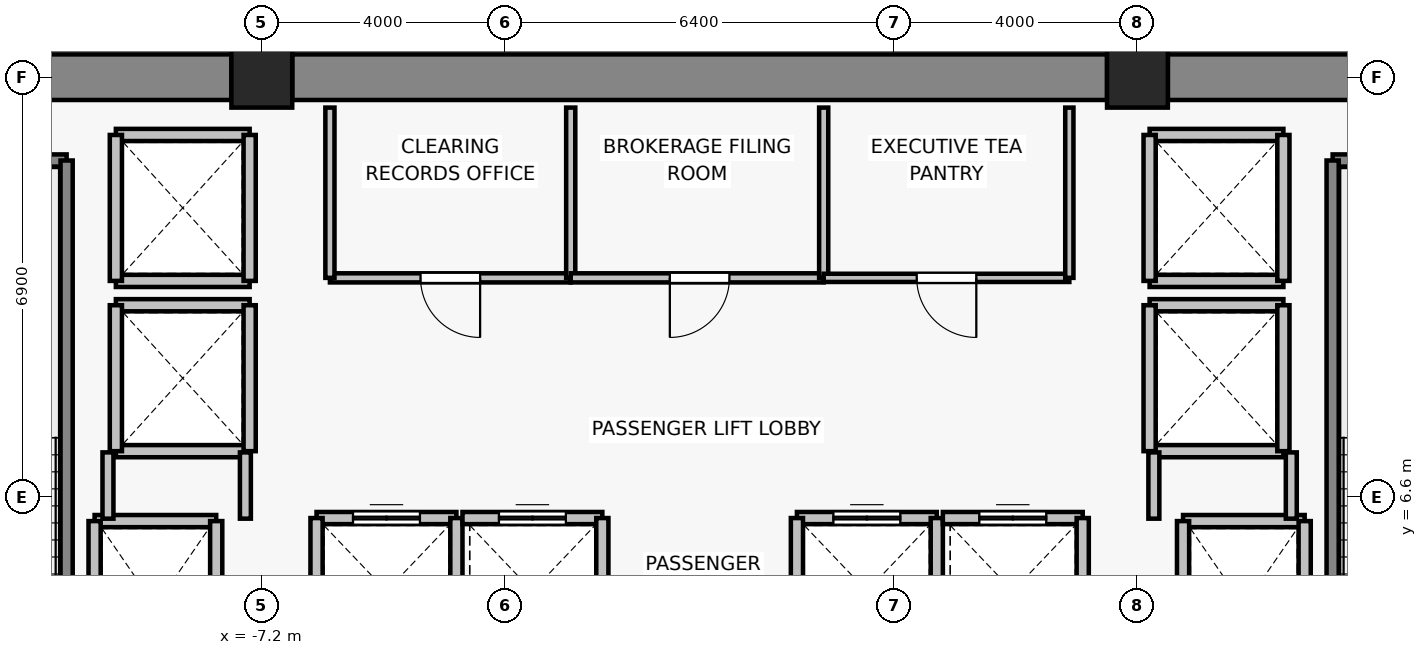
"""IFC4 building model, lengths in metres.
Left out: names, types, materials, properties, quantities, classifications, styles, units other than length and angle.
Written with IfcOpenShell. Run it as: python <this file> out.ifc"""

import sys

from ifc_helpers import new_model, si_unit, direction, frame, frame_2d, origin, origin_2d, place, context, subcontext, project, spatial, rectangle, extrude, source, transform, mapped, element, fill, save


model = new_model("IFC4")
c1 = context("Model", 3, precision=1e-05, world=origin(), true_north=direction((0.0, 1.0)))
c2 = subcontext(c1, "Body", "Model", "MODEL_VIEW")
j1 = project(units=[si_unit("LENGTHUNIT", "METRE"), si_unit("PLANEANGLEUNIT", "RADIAN")], contexts=[c1])
p1 = place(None, origin())
s1 = spatial("IfcSite", under=j1, at=p1, CompositionType="ELEMENT")
p2 = place(p1, origin())
s2 = spatial("IfcBuilding", under=s1, at=p2, CompositionType="ELEMENT")
p3 = place(p2, frame((0.0, 0.0, 133.0)))
s3 = spatial("IfcBuildingStorey", under=s2, at=p3, CompositionType="ELEMENT", Elevation=133.0)
for number, where, z_axis, x_axis in (
    (1, (-7.2, 13.5, 0.0), (0.0, 0.0, 1.0), (1.0, 0.0, 0.0)),
    (2, (7.2, 13.5, 0.0), (0.0, 0.0, 1.0), (1.0, 0.0, 0.0)),
):
    element("IfcColumn", number, at=place(p3, frame(where, z_axis=z_axis, x_axis=x_axis)), inside=s3, PredefinedType="COLUMN", context=c2, shape_type="SweptSolid", body=[
        extrude(rectangle(XDim=1.0, YDim=1.0, at=origin_2d()), origin(), (0.0, 0.0, 1.0), 3.3),
    ])
p4 = place(p3, frame((-13.9, 13.5, 0.0), z_axis=(0.0, 0.0, 1.0), x_axis=(1.0, 0.0, 0.0)))
e3 = element("IfcWall", 3, at=p4, inside=s3, PredefinedType="SHEAR", context=c2, shape_type="SweptSolid", body=[
    extrude(rectangle(XDim=6.2, YDim=0.75, at=frame_2d((3.1, 0.0))), origin(), (0.0, 0.0, 1.0), 3.075),
])
p5 = place(p3, frame((-6.7, 13.5, 0.0), z_axis=(0.0, 0.0, 1.0), x_axis=(1.0, 0.0, 0.0)))
e4 = element("IfcWall", 4, at=p5, inside=s3, PredefinedType="SHEAR", context=c2, shape_type="SweptSolid", body=[
    extrude(rectangle(XDim=13.4, YDim=0.75, at=frame_2d((6.7, 0.0))), origin(), (0.0, 0.0, 1.0), 3.075),
])
p6 = place(p3, frame((7.7, 13.5, 0.0), z_axis=(0.0, 0.0, 1.0), x_axis=(1.0, 0.0, 0.0)))
e5 = element("IfcWall", 5, at=p6, inside=s3, PredefinedType="SHEAR", context=c2, shape_type="SweptSolid", body=[
    extrude(rectangle(XDim=6.2, YDim=0.75, at=frame_2d((3.1, 0.0))), origin(), (0.0, 0.0, 1.0), 3.075),
])
p7 = place(p3, frame((-9.95, 6.2, 0.0), z_axis=(0.0, 0.0, 1.0), x_axis=(1.0, 0.0, 0.0)))
e6 = element("IfcWall", 6, at=p7, inside=s3, PredefinedType="SOLIDWALL", context=c2, shape_type="SweptSolid", body=[
    extrude(rectangle(XDim=2.0, YDim=0.2, at=frame_2d((1.0, 0.0))), origin(), (0.0, 0.0, 1.0), 3.075),
])
for number, where, z_axis, x_axis in (
    (7, (-9.95, 3.4, 0.0), (0.0, 0.0, 1.0), (0.0, 1.0, 0.0)),
    (8, (-7.95, 6.2, 0.0), (0.0, 0.0, 1.0), (0.0, -1.0, 0.0)),
):
    element("IfcWall", number, at=place(p3, frame(where, z_axis=z_axis, x_axis=x_axis)), inside=s3, PredefinedType="SOLIDWALL", context=c2, shape_type="SweptSolid", body=[
        extrude(rectangle(XDim=2.8, YDim=0.2, at=frame_2d((1.4, 0.0))), origin(), (0.0, 0.0, 1.0), 3.075),
    ])
p8 = place(p3, frame((7.95, 6.2, 0.0), z_axis=(0.0, 0.0, 1.0), x_axis=(1.0, 0.0, 0.0)))
e9 = element("IfcWall", 9, at=p8, inside=s3, PredefinedType="SOLIDWALL", context=c2, shape_type="SweptSolid", body=[
    extrude(rectangle(XDim=2.0, YDim=0.2, at=frame_2d((1.0, 0.0))), origin(), (0.0, 0.0, 1.0), 3.075),
])
for number, where, z_axis, x_axis in (
    (10, (7.95, 3.4, 0.0), (0.0, 0.0, 1.0), (0.0, 1.0, 0.0)),
    (11, (9.95, 6.2, 0.0), (0.0, 0.0, 1.0), (0.0, -1.0, 0.0)),
):
    element("IfcWall", number, at=place(p3, frame(where, z_axis=z_axis, x_axis=x_axis)), inside=s3, PredefinedType="SOLIDWALL", context=c2, shape_type="SweptSolid", body=[
        extrude(rectangle(XDim=2.8, YDim=0.2, at=frame_2d((1.4, 0.0))), origin(), (0.0, 0.0, 1.0), 3.075),
    ])
p9 = place(p3, frame((-6.3, 6.25, 0.0), z_axis=(0.0, 0.0, 1.0), x_axis=(1.0, 0.0, 0.0)))
e12 = element("IfcWall", 12, at=p9, inside=s3, PredefinedType="SOLIDWALL", context=c2, shape_type="SweptSolid", body=[
    extrude(rectangle(XDim=2.3, YDim=0.2, at=frame_2d((1.15, 0.0))), origin(), (0.0, 0.0, 1.0), 3.075),
])
p10 = place(p9, frame((0.6, 0.0, 0.0)))
e13 = element("IfcOpeningElement", 13, at=p10, cuts=e12, PredefinedType="OPENING", context=c2, shape_type="SweptSolid", body=[
    extrude(rectangle(XDim=1.1, YDim=2.2, at=frame_2d((0.55, 1.1))), frame((0.0, 0.11, 0.0), z_axis=(0.0, -1.0, 0.0), x_axis=(1.0, 0.0, 0.0)), (0.0, 0.0, 1.0), 0.22),
])
for number, where, z_axis, x_axis in (
    (14, (-6.3, 3.85, 0.0), (0.0, 0.0, 1.0), (0.0, 1.0, 0.0)),
    (15, (-4.0, 6.25, 0.0), (0.0, 0.0, 1.0), (0.0, -1.0, 0.0)),
):
    element("IfcWall", number, at=place(p3, frame(where, z_axis=z_axis, x_axis=x_axis)), inside=s3, PredefinedType="SOLIDWALL", context=c2, shape_type="SweptSolid", body=[
        extrude(rectangle(XDim=2.4, YDim=0.2, at=frame_2d((1.2, 0.0))), origin(), (0.0, 0.0, 1.0), 3.075),
    ])
p11 = place(p3, frame((-3.9, 6.25, 0.0), z_axis=(0.0, 0.0, 1.0), x_axis=(1.0, 0.0, 0.0)))
e16 = element("IfcWall", 16, at=p11, inside=s3, PredefinedType="SOLIDWALL", context=c2, shape_type="SweptSolid", body=[
    extrude(rectangle(XDim=2.3, YDim=0.2, at=frame_2d((1.15, 0.0))), origin(), (0.0, 0.0, 1.0), 3.075),
])
p12 = place(p11, frame((0.6, 0.0, 0.0)))
e17 = element("IfcOpeningElement", 17, at=p12, cuts=e16, PredefinedType="OPENING", context=c2, shape_type="SweptSolid", body=[
    extrude(rectangle(XDim=1.1, YDim=2.2, at=frame_2d((0.55, 1.1))), frame((0.0, 0.11, 0.0), z_axis=(0.0, -1.0, 0.0), x_axis=(1.0, 0.0, 0.0)), (0.0, 0.0, 1.0), 0.22),
])
p13 = place(p3, frame((-1.6, 6.25, 0.0), z_axis=(0.0, 0.0, 1.0), x_axis=(0.0, -1.0, 0.0)))
e18 = element("IfcWall", 18, at=p13, inside=s3, PredefinedType="SOLIDWALL", context=c2, shape_type="SweptSolid", body=[
    extrude(rectangle(XDim=2.4, YDim=0.2, at=frame_2d((1.2, 0.0))), origin(), (0.0, 0.0, 1.0), 3.075),
])
p14 = place(p3, frame((1.6, 6.25, 0.0), z_axis=(0.0, 0.0, 1.0), x_axis=(1.0, 0.0, 0.0)))
e19 = element("IfcWall", 19, at=p14, inside=s3, PredefinedType="SOLIDWALL", context=c2, shape_type="SweptSolid", body=[
    extrude(rectangle(XDim=2.3, YDim=0.2, at=frame_2d((1.15, 0.0))), origin(), (0.0, 0.0, 1.0), 3.075),
])
p15 = place(p14, frame((0.6, 0.0, 0.0)))
e20 = element("IfcOpeningElement", 20, at=p15, cuts=e19, PredefinedType="OPENING", context=c2, shape_type="SweptSolid", body=[
    extrude(rectangle(XDim=1.1, YDim=2.2, at=frame_2d((0.55, 1.1))), frame((0.0, 0.11, 0.0), z_axis=(0.0, -1.0, 0.0), x_axis=(1.0, 0.0, 0.0)), (0.0, 0.0, 1.0), 0.22),
])
for number, where, z_axis, x_axis in (
    (21, (1.6, 3.85, 0.0), (0.0, 0.0, 1.0), (0.0, 1.0, 0.0)),
    (22, (3.9, 6.25, 0.0), (0.0, 0.0, 1.0), (0.0, -1.0, 0.0)),
):
    element("IfcWall", number, at=place(p3, frame(where, z_axis=z_axis, x_axis=x_axis)), inside=s3, PredefinedType="SOLIDWALL", context=c2, shape_type="SweptSolid", body=[
        extrude(rectangle(XDim=2.4, YDim=0.2, at=frame_2d((1.2, 0.0))), origin(), (0.0, 0.0, 1.0), 3.075),
    ])
p16 = place(p3, frame((4.0, 6.25, 0.0), z_axis=(0.0, 0.0, 1.0), x_axis=(1.0, 0.0, 0.0)))
e23 = element("IfcWall", 23, at=p16, inside=s3, PredefinedType="SOLIDWALL", context=c2, shape_type="SweptSolid", body=[
    extrude(rectangle(XDim=2.3, YDim=0.2, at=frame_2d((1.15, 0.0))), origin(), (0.0, 0.0, 1.0), 3.075),
])
p17 = place(p16, frame((0.6, 0.0, 0.0)))
e24 = element("IfcOpeningElement", 24, at=p17, cuts=e23, PredefinedType="OPENING", context=c2, shape_type="SweptSolid", body=[
    extrude(rectangle(XDim=1.1, YDim=2.2, at=frame_2d((0.55, 1.1))), frame((0.0, 0.11, 0.0), z_axis=(0.0, -1.0, 0.0), x_axis=(1.0, 0.0, 0.0)), (0.0, 0.0, 1.0), 0.22),
])
p18 = place(p3, frame((6.3, 6.25, 0.0), z_axis=(0.0, 0.0, 1.0), x_axis=(0.0, -1.0, 0.0)))
e25 = element("IfcWall", 25, at=p18, inside=s3, PredefinedType="SOLIDWALL", context=c2, shape_type="SweptSolid", body=[
    extrude(rectangle(XDim=2.4, YDim=0.2, at=frame_2d((1.2, 0.0))), origin(), (0.0, 0.0, 1.0), 3.075),
])
for number, where, z_axis, x_axis in (
    (26, (-7.4, 7.35, 0.0), (0.0, 0.0, 1.0), (-1.0, 0.0, 0.0)),
    (27, (-9.6, 9.75, 0.0), (0.0, 0.0, 1.0), (1.0, 0.0, 0.0)),
):
    element("IfcWall", number, at=place(p3, frame(where, z_axis=z_axis, x_axis=x_axis)), inside=s3, PredefinedType="SOLIDWALL", context=c2, shape_type="SweptSolid", body=[
        extrude(rectangle(XDim=2.2, YDim=0.2, at=frame_2d((1.1, 0.0))), origin(), (0.0, 0.0, 1.0), 2.515),
    ])
p19 = place(p3, frame((-9.6, 7.35, 0.0), z_axis=(0.0, 0.0, 1.0), x_axis=(0.0, 1.0, 0.0)))
e28 = element("IfcWall", 28, at=p19, inside=s3, PredefinedType="SOLIDWALL", context=c2, shape_type="SweptSolid", body=[
    extrude(rectangle(XDim=2.4, YDim=0.2, at=frame_2d((1.2, 0.0))), origin(), (0.0, 0.0, 1.0), 3.075),
])
p20 = place(p3, frame((-7.4, 9.75, 0.0), z_axis=(0.0, 0.0, 1.0), x_axis=(0.0, -1.0, 0.0)))
e29 = element("IfcWall", 29, at=p20, inside=s3, PredefinedType="SOLIDWALL", context=c2, shape_type="SweptSolid", body=[
    extrude(rectangle(XDim=2.4, YDim=0.2, at=frame_2d((1.2, 0.0))), origin(), (0.0, 0.0, 1.0), 2.515),
])
for number, where, z_axis, x_axis in (
    (30, (-7.4, 10.15, 0.0), (0.0, 0.0, 1.0), (-1.0, 0.0, 0.0)),
    (31, (-9.6, 12.55, 0.0), (0.0, 0.0, 1.0), (1.0, 0.0, 0.0)),
):
    element("IfcWall", number, at=place(p3, frame(where, z_axis=z_axis, x_axis=x_axis)), inside=s3, PredefinedType="SOLIDWALL", context=c2, shape_type="SweptSolid", body=[
        extrude(rectangle(XDim=2.2, YDim=0.2, at=frame_2d((1.1, 0.0))), origin(), (0.0, 0.0, 1.0), 2.515),
    ])
p21 = place(p3, frame((-9.6, 10.15, 0.0), z_axis=(0.0, 0.0, 1.0), x_axis=(0.0, 1.0, 0.0)))
e32 = element("IfcWall", 32, at=p21, inside=s3, PredefinedType="SOLIDWALL", context=c2, shape_type="SweptSolid", body=[
    extrude(rectangle(XDim=2.4, YDim=0.2, at=frame_2d((1.2, 0.0))), origin(), (0.0, 0.0, 1.0), 3.075),
])
p22 = place(p3, frame((-7.4, 12.55, 0.0), z_axis=(0.0, 0.0, 1.0), x_axis=(0.0, -1.0, 0.0)))
e33 = element("IfcWall", 33, at=p22, inside=s3, PredefinedType="SOLIDWALL", context=c2, shape_type="SweptSolid", body=[
    extrude(rectangle(XDim=2.4, YDim=0.2, at=frame_2d((1.2, 0.0))), origin(), (0.0, 0.0, 1.0), 2.515),
])
for number, where, z_axis, x_axis in (
    (34, (9.6, 7.35, 0.0), (0.0, 0.0, 1.0), (-1.0, 0.0, 0.0)),
    (35, (7.4, 9.75, 0.0), (0.0, 0.0, 1.0), (1.0, 0.0, 0.0)),
):
    element("IfcWall", number, at=place(p3, frame(where, z_axis=z_axis, x_axis=x_axis)), inside=s3, PredefinedType="SOLIDWALL", context=c2, shape_type="SweptSolid", body=[
        extrude(rectangle(XDim=2.2, YDim=0.2, at=frame_2d((1.1, 0.0))), origin(), (0.0, 0.0, 1.0), 2.515),
    ])
p23 = place(p3, frame((7.4, 7.35, 0.0), z_axis=(0.0, 0.0, 1.0), x_axis=(0.0, 1.0, 0.0)))
e36 = element("IfcWall", 36, at=p23, inside=s3, PredefinedType="SOLIDWALL", context=c2, shape_type="SweptSolid", body=[
    extrude(rectangle(XDim=2.4, YDim=0.2, at=frame_2d((1.2, 0.0))), origin(), (0.0, 0.0, 1.0), 2.515),
])
p24 = place(p3, frame((9.6, 9.75, 0.0), z_axis=(0.0, 0.0, 1.0), x_axis=(0.0, -1.0, 0.0)))
e37 = element("IfcWall", 37, at=p24, inside=s3, PredefinedType="SOLIDWALL", context=c2, shape_type="SweptSolid", body=[
    extrude(rectangle(XDim=2.4, YDim=0.2, at=frame_2d((1.2, 0.0))), origin(), (0.0, 0.0, 1.0), 3.075),
])
for number, where, z_axis, x_axis in (
    (38, (9.6, 10.15, 0.0), (0.0, 0.0, 1.0), (-1.0, 0.0, 0.0)),
    (39, (7.4, 12.55, 0.0), (0.0, 0.0, 1.0), (1.0, 0.0, 0.0)),
):
    element("IfcWall", number, at=place(p3, frame(where, z_axis=z_axis, x_axis=x_axis)), inside=s3, PredefinedType="SOLIDWALL", context=c2, shape_type="SweptSolid", body=[
        extrude(rectangle(XDim=2.2, YDim=0.2, at=frame_2d((1.1, 0.0))), origin(), (0.0, 0.0, 1.0), 2.515),
    ])
p25 = place(p3, frame((7.4, 10.15, 0.0), z_axis=(0.0, 0.0, 1.0), x_axis=(0.0, 1.0, 0.0)))
e40 = element("IfcWall", 40, at=p25, inside=s3, PredefinedType="SOLIDWALL", context=c2, shape_type="SweptSolid", body=[
    extrude(rectangle(XDim=2.4, YDim=0.2, at=frame_2d((1.2, 0.0))), origin(), (0.0, 0.0, 1.0), 2.515),
])
p26 = place(p3, frame((9.6, 12.55, 0.0), z_axis=(0.0, 0.0, 1.0), x_axis=(0.0, -1.0, 0.0)))
e41 = element("IfcWall", 41, at=p26, inside=s3, PredefinedType="SOLIDWALL", context=c2, shape_type="SweptSolid", body=[
    extrude(rectangle(XDim=2.4, YDim=0.2, at=frame_2d((1.2, 0.0))), origin(), (0.0, 0.0, 1.0), 3.075),
])
p27 = place(p3, frame((-13.93, 12.13, 0.0), z_axis=(0.0, 0.0, 1.0), x_axis=(1.0, 0.0, 0.0)))
e42 = element("IfcWall", 42, at=p27, inside=s3, PredefinedType="SOLIDWALL", context=c2, shape_type="SweptSolid", body=[
    extrude(rectangle(XDim=3.52, YDim=0.2, at=frame_2d((1.76, 0.0))), origin(), (0.0, 0.0, 1.0), 3.075),
])
p28 = place(p3, frame((-10.41, 12.13, 0.0), z_axis=(0.0, 0.0, 1.0), x_axis=(0.0, -1.0, 0.0)))
e43 = element("IfcWall", 43, at=p28, inside=s3, PredefinedType="SOLIDWALL", context=c2, shape_type="SweptSolid", body=[
    extrude(rectangle(XDim=8.84, YDim=0.2, at=frame_2d((4.42, 0.0))), origin(), (0.0, 0.0, 1.0), 3.075),
])
p29 = place(p3, frame((10.41, 12.13, 0.0), z_axis=(0.0, 0.0, 1.0), x_axis=(1.0, 0.0, 0.0)))
e44 = element("IfcWall", 44, at=p29, inside=s3, PredefinedType="SOLIDWALL", context=c2, shape_type="SweptSolid", body=[
    extrude(rectangle(XDim=3.52, YDim=0.2, at=frame_2d((1.76, 0.0))), origin(), (0.0, 0.0, 1.0), 3.075),
])
p30 = place(p3, frame((10.41, 3.29, 0.0), z_axis=(0.0, 0.0, 1.0), x_axis=(0.0, 1.0, 0.0)))
e45 = element("IfcWall", 45, at=p30, inside=s3, PredefinedType="SOLIDWALL", context=c2, shape_type="SweptSolid", body=[
    extrude(rectangle(XDim=8.84, YDim=0.2, at=frame_2d((4.42, 0.0))), origin(), (0.0, 0.0, 1.0), 3.075),
])
p31 = place(p3, frame((-9.73, 6.24, 0.0), z_axis=(0.0, 0.0, 1.0), x_axis=(0.0, 1.0, 0.0)))
e46 = element("IfcWall", 46, at=p31, inside=s3, PredefinedType="PARTITIONING", context=c2, shape_type="SweptSolid", body=[
    extrude(rectangle(XDim=1.09, YDim=0.18, at=frame_2d((0.545, 0.0))), origin(), (0.0, 0.0, 1.0), 3.075),
])
for number, where, z_axis, x_axis in (
    (47, (-7.47, 7.33, 0.0), (0.0, 0.0, 1.0), (0.0, -1.0, 0.0)),
    (48, (7.47, 6.24, 0.0), (0.0, 0.0, 1.0), (0.0, 1.0, 0.0)),
):
    element("IfcWall", number, at=place(p3, frame(where, z_axis=z_axis, x_axis=x_axis)), inside=s3, PredefinedType="PARTITIONING", context=c2, shape_type="SweptSolid", body=[
        extrude(rectangle(XDim=1.09, YDim=0.18, at=frame_2d((0.545, 0.0))), origin(), (0.0, 0.0, 1.0), 2.515),
    ])
p32 = place(p3, frame((9.73, 7.33, 0.0), z_axis=(0.0, 0.0, 1.0), x_axis=(0.0, -1.0, 0.0)))
e49 = element("IfcWall", 49, at=p32, inside=s3, PredefinedType="PARTITIONING", context=c2, shape_type="SweptSolid", body=[
    extrude(rectangle(XDim=1.09, YDim=0.18, at=frame_2d((0.545, 0.0))), origin(), (0.0, 0.0, 1.0), 3.075),
])
p33 = place(p3, frame((-2.12, 10.2, 0.0), z_axis=(0.0, 0.0, 1.0), x_axis=(-1.0, 0.0, 0.0)))
e50 = element("IfcWall", 50, at=p33, inside=s3, PredefinedType="PARTITIONING", context=c2, shape_type="SweptSolid", body=[
    extrude(rectangle(XDim=3.96, YDim=0.15, at=frame_2d((1.98, 0.0))), origin(), (0.0, 0.0, 1.0), 3.075),
])
p34 = place(p33, frame((1.49, 0.0, 0.0)))
e51 = element("IfcOpeningElement", 51, at=p34, cuts=e50, PredefinedType="OPENING", context=c2, shape_type="SweptSolid", body=[
    extrude(rectangle(XDim=0.98, YDim=2.15, at=frame_2d((0.49, 1.075))), frame((0.0, 0.085, 0.0), z_axis=(0.0, -1.0, 0.0), x_axis=(1.0, 0.0, 0.0)), (0.0, 0.0, 1.0), 0.17),
])
for number, where, z_axis, x_axis in (
    (52, (-6.08, 10.2, 0.0), (0.0, 0.0, 1.0), (0.0, 1.0, 0.0)),
    (53, (-2.12, 13.0, 0.0), (0.0, 0.0, 1.0), (0.0, -1.0, 0.0)),
):
    element("IfcWall", number, at=place(p3, frame(where, z_axis=z_axis, x_axis=x_axis)), inside=s3, PredefinedType="PARTITIONING", context=c2, shape_type="SweptSolid", body=[
        extrude(rectangle(XDim=2.8, YDim=0.15, at=frame_2d((1.4, 0.0))), origin(), (0.0, 0.0, 1.0), 3.075),
    ])
p35 = place(p3, frame((2.04, 10.2, 0.0), z_axis=(0.0, 0.0, 1.0), x_axis=(-1.0, 0.0, 0.0)))
e54 = element("IfcWall", 54, at=p35, inside=s3, PredefinedType="PARTITIONING", context=c2, shape_type="SweptSolid", body=[
    extrude(rectangle(XDim=4.16, YDim=0.15, at=frame_2d((2.08, 0.0))), origin(), (0.0, 0.0, 1.0), 3.075),
])
p36 = place(p35, frame((1.55, 0.0, 0.0)))
e55 = element("IfcOpeningElement", 55, at=p36, cuts=e54, PredefinedType="OPENING", context=c2, shape_type="SweptSolid", body=[
    extrude(rectangle(XDim=0.98, YDim=2.15, at=frame_2d((0.49, 1.075))), frame((0.0, 0.085, 0.0), z_axis=(0.0, -1.0, 0.0), x_axis=(1.0, 0.0, 0.0)), (0.0, 0.0, 1.0), 0.17),
])
p37 = place(p3, frame((2.04, 13.0, 0.0), z_axis=(0.0, 0.0, 1.0), x_axis=(0.0, -1.0, 0.0)))
e56 = element("IfcWall", 56, at=p37, inside=s3, PredefinedType="PARTITIONING", context=c2, shape_type="SweptSolid", body=[
    extrude(rectangle(XDim=2.8, YDim=0.15, at=frame_2d((1.4, 0.0))), origin(), (0.0, 0.0, 1.0), 3.075),
])
p38 = place(p3, frame((6.08, 10.2, 0.0), z_axis=(0.0, 0.0, 1.0), x_axis=(-1.0, 0.0, 0.0)))
e57 = element("IfcWall", 57, at=p38, inside=s3, PredefinedType="PARTITIONING", context=c2, shape_type="SweptSolid", body=[
    extrude(rectangle(XDim=4.04, YDim=0.135, at=frame_2d((2.02, 0.0))), origin(), (0.0, 0.0, 1.0), 3.075),
])
p39 = place(p38, frame((1.53, 0.0, 0.0)))
e58 = element("IfcOpeningElement", 58, at=p39, cuts=e57, PredefinedType="OPENING", context=c2, shape_type="SweptSolid", body=[
    extrude(rectangle(XDim=0.98, YDim=2.15, at=frame_2d((0.49, 1.075))), frame((0.0, 0.077, 0.0), z_axis=(0.0, -1.0, 0.0), x_axis=(1.0, 0.0, 0.0)), (0.0, 0.0, 1.0), 0.155),
])
p40 = place(p3, frame((6.08, 13.0, 0.0), z_axis=(0.0, 0.0, 1.0), x_axis=(0.0, -1.0, 0.0)))
e59 = element("IfcWall", 59, at=p40, inside=s3, PredefinedType="PARTITIONING", context=c2, shape_type="SweptSolid", body=[
    extrude(rectangle(XDim=2.8, YDim=0.135, at=frame_2d((1.4, 0.0))), origin(), (0.0, 0.0, 1.0), 3.075),
])
m1 = source(origin(), c2, "Body", "SweptSolid", [
    extrude(rectangle(XDim=1.1, YDim=2.2, at=frame_2d((0.55, 1.1))), frame((0.0, 0.025, 0.0), z_axis=(0.0, -1.0, 0.0), x_axis=(1.0, 0.0, 0.0)), (0.0, 0.0, 1.0), 0.05),
])
p41 = place(p10, origin())
e60 = element("IfcDoor", 60, at=p41, inside=s3, OperationType="DOUBLE_DOOR_SLIDING", PredefinedType="DOOR", context=c2, shape_type="MappedRepresentation", body=[
    mapped(m1, transform((0.0, 0.0, 0.0), x_axis=(1.0, 0.0, 0.0), y_axis=(0.0, 1.0, 0.0), z_axis=(0.0, 0.0, 1.0), scale=1.0)),
])
fill(e13, e60)
p42 = place(p12, origin())
e61 = element("IfcDoor", 61, at=p42, inside=s3, OperationType="DOUBLE_DOOR_SLIDING", PredefinedType="DOOR", context=c2, shape_type="MappedRepresentation", body=[
    mapped(m1, transform((0.0, 0.0, 0.0), x_axis=(1.0, 0.0, 0.0), y_axis=(0.0, 1.0, 0.0), z_axis=(0.0, 0.0, 1.0), scale=1.0)),
])
fill(e17, e61)
p43 = place(p15, origin())
e62 = element("IfcDoor", 62, at=p43, inside=s3, OperationType="DOUBLE_DOOR_SLIDING", PredefinedType="DOOR", context=c2, shape_type="MappedRepresentation", body=[
    mapped(m1, transform((0.0, 0.0, 0.0), x_axis=(1.0, 0.0, 0.0), y_axis=(0.0, 1.0, 0.0), z_axis=(0.0, 0.0, 1.0), scale=1.0)),
])
fill(e20, e62)
p44 = place(p17, origin())
e63 = element("IfcDoor", 63, at=p44, inside=s3, OperationType="DOUBLE_DOOR_SLIDING", PredefinedType="DOOR", context=c2, shape_type="MappedRepresentation", body=[
    mapped(m1, transform((0.0, 0.0, 0.0), x_axis=(1.0, 0.0, 0.0), y_axis=(0.0, 1.0, 0.0), z_axis=(0.0, 0.0, 1.0), scale=1.0)),
])
fill(e24, e63)
m2 = source(origin(), c2, "Body", "SweptSolid", [
    extrude(rectangle(XDim=0.98, YDim=2.15, at=frame_2d((0.49, 1.075))), frame((0.0, 0.025, 0.0), z_axis=(0.0, -1.0, 0.0), x_axis=(1.0, 0.0, 0.0)), (0.0, 0.0, 1.0), 0.05),
])
p45 = place(p34, origin())
e64 = element("IfcDoor", 64, at=p45, inside=s3, OperationType="SINGLE_SWING_LEFT", PredefinedType="DOOR", context=c2, shape_type="MappedRepresentation", body=[
    mapped(m2, transform((0.0, 0.0, 0.0), x_axis=(1.0, 0.0, 0.0), y_axis=(0.0, 1.0, 0.0), z_axis=(0.0, 0.0, 1.0), scale=1.0)),
])
fill(e51, e64)
p46 = place(p36, origin())
e65 = element("IfcDoor", 65, at=p46, inside=s3, OperationType="SINGLE_SWING_RIGHT", PredefinedType="DOOR", context=c2, shape_type="MappedRepresentation", body=[
    mapped(m2, transform((0.0, 0.0, 0.0), x_axis=(1.0, 0.0, 0.0), y_axis=(0.0, 1.0, 0.0), z_axis=(0.0, 0.0, 1.0), scale=1.0)),
])
fill(e55, e65)
p47 = place(p39, origin())
e66 = element("IfcDoor", 66, at=p47, inside=s3, OperationType="SINGLE_SWING_LEFT", PredefinedType="DOOR", context=c2, shape_type="MappedRepresentation", body=[
    mapped(m2, transform((0.0, 0.0, 0.0), x_axis=(1.0, 0.0, 0.0), y_axis=(0.0, 1.0, 0.0), z_axis=(0.0, 0.0, 1.0), scale=1.0)),
])
fill(e58, e66)
save(model, sys.argv[1])
